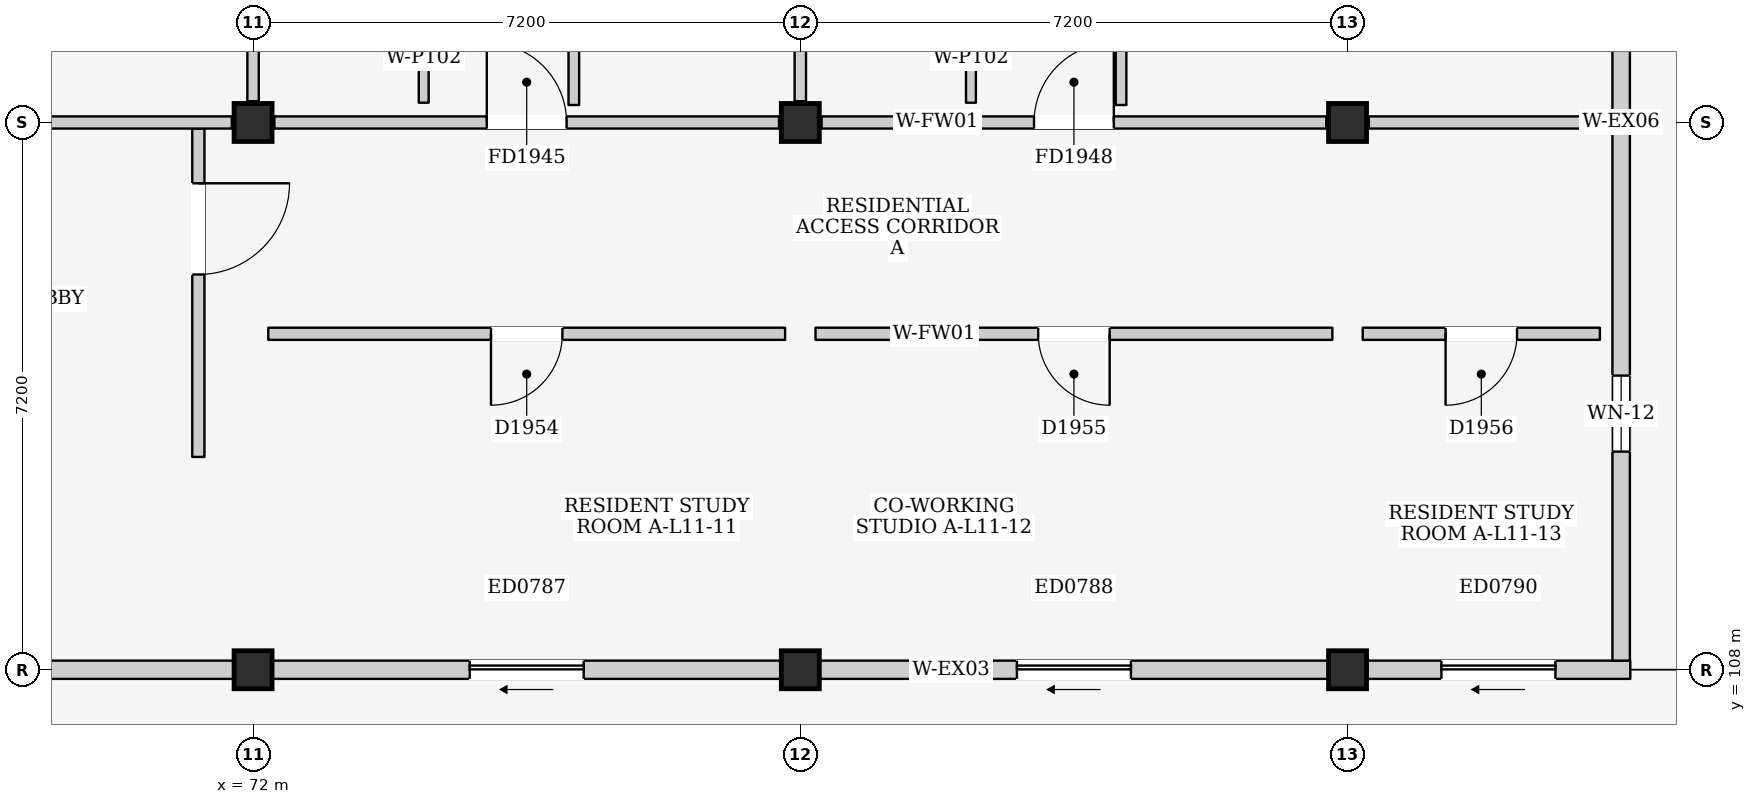
"""IFC4 building model, lengths in metres.
Left out: names, types, materials, properties, quantities, classifications, styles, units other than length and angle.
Written with IfcOpenShell. Run it as: python <this file> out.ifc"""

import sys

from ifc_helpers import new_model, si_unit, direction, frame, frame_2d, origin, origin_2d, place, context, subcontext, project, spatial, rectangle, extrude, element, fill, save


model = new_model("IFC4")
c1 = context("Model", 3, precision=1e-05, world=origin(), true_north=direction((0.0, 1.0)))
c2 = subcontext(c1, "Body", "Model", "MODEL_VIEW")
j1 = project(units=[si_unit("LENGTHUNIT", "METRE"), si_unit("PLANEANGLEUNIT", "RADIAN")], contexts=[c1])
p1 = place(None, origin())
s1 = spatial("IfcSite", under=j1, at=p1, CompositionType="ELEMENT")
p2 = place(p1, origin())
s2 = spatial("IfcBuilding", under=s1, at=p2, CompositionType="ELEMENT")
p3 = place(p2, frame((0.0, 0.0, 38.0)))
s3 = spatial("IfcBuildingStorey", under=s2, at=p3, CompositionType="ELEMENT", Elevation=38.0)
for number, where, z_axis, x_axis in (
    (1, (72.0, 108.0, 0.0), (0.0, 0.0, 1.0), (1.0, 0.0, 0.0)),
    (2, (72.0, 115.2, 0.0), (0.0, 0.0, 1.0), (1.0, 0.0, 0.0)),
    (3, (79.2, 108.0, 0.0), (0.0, 0.0, 1.0), (1.0, 0.0, 0.0)),
    (4, (79.2, 115.2, 0.0), (0.0, 0.0, 1.0), (1.0, 0.0, 0.0)),
    (5, (86.4, 108.0, 0.0), (0.0, 0.0, 1.0), (1.0, 0.0, 0.0)),
    (6, (86.4, 115.2, 0.0), (0.0, 0.0, 1.0), (1.0, 0.0, 0.0)),
):
    element("IfcColumn", number, at=place(p3, frame(where, z_axis=z_axis, x_axis=x_axis)), inside=s3, PredefinedType="COLUMN", context=c2, shape_type="SweptSolid", body=[
        extrude(rectangle(XDim=0.5, YDim=0.5, at=origin_2d()), origin(), (0.0, 0.0, 1.0), 3.2),
    ])
p4 = place(p3, frame((65.05, 108.0, 0.0), z_axis=(0.0, 0.0, 1.0), x_axis=(1.0, 0.0, 0.0)))
e7 = element("IfcWall", 7, at=p4, inside=s3, PredefinedType="ELEMENTEDWALL", context=c2, shape_type="SweptSolid", body=[
    extrude(rectangle(XDim=6.7, YDim=0.24, at=frame_2d((3.35, 0.0))), origin(), (0.0, 0.0, 1.0), 2.325),
])
p5 = place(p4, frame((2.85, 0.0, 1.2)))
e8 = element("IfcOpeningElement", 8, at=p5, cuts=e7, PredefinedType="OPENING", context=c2, shape_type="SweptSolid", body=[
    extrude(rectangle(XDim=1.0, YDim=0.9, at=frame_2d((0.5, 0.45))), frame((0.0, 0.135, 0.0), z_axis=(0.0, -1.0, 0.0), x_axis=(1.0, 0.0, 0.0)), (0.0, 0.0, 1.0), 0.27),
])
p6 = place(p3, frame((72.25, 108.0, 0.0), z_axis=(0.0, 0.0, 1.0), x_axis=(1.0, 0.0, 0.0)))
e9 = element("IfcWall", 9, at=p6, inside=s3, PredefinedType="ELEMENTEDWALL", context=c2, shape_type="SweptSolid", body=[
    extrude(rectangle(XDim=6.7, YDim=0.24, at=frame_2d((3.35, 0.0))), origin(), (0.0, 0.0, 1.0), 2.325),
])
p7 = place(p6, frame((2.6, 0.0, 0.0)))
e10 = element("IfcOpeningElement", 10, at=p7, cuts=e9, PredefinedType="OPENING", context=c2, shape_type="SweptSolid", body=[
    extrude(rectangle(XDim=1.5, YDim=2.12, at=frame_2d((0.75, 1.06))), frame((0.0, 0.135, 0.0), z_axis=(0.0, -1.0, 0.0), x_axis=(1.0, 0.0, 0.0)), (0.0, 0.0, 1.0), 0.27),
])
p8 = place(p3, frame((79.45, 108.0, 0.0), z_axis=(0.0, 0.0, 1.0), x_axis=(1.0, 0.0, 0.0)))
e11 = element("IfcWall", 11, at=p8, inside=s3, PredefinedType="ELEMENTEDWALL", context=c2, shape_type="SweptSolid", body=[
    extrude(rectangle(XDim=6.7, YDim=0.24, at=frame_2d((3.35, 0.0))), origin(), (0.0, 0.0, 1.0), 2.325),
])
p9 = place(p8, frame((2.6, 0.0, 0.0)))
e12 = element("IfcOpeningElement", 12, at=p9, cuts=e11, PredefinedType="OPENING", context=c2, shape_type="SweptSolid", body=[
    extrude(rectangle(XDim=1.5, YDim=2.12, at=frame_2d((0.75, 1.06))), frame((0.0, 0.135, 0.0), z_axis=(0.0, -1.0, 0.0), x_axis=(1.0, 0.0, 0.0)), (0.0, 0.0, 1.0), 0.27),
])
p10 = place(p3, frame((86.65, 108.0, 0.0), z_axis=(0.0, 0.0, 1.0), x_axis=(1.0, 0.0, 0.0)))
e13 = element("IfcWall", 13, at=p10, inside=s3, PredefinedType="ELEMENTEDWALL", context=c2, shape_type="SweptSolid", body=[
    extrude(rectangle(XDim=3.47, YDim=0.24, at=frame_2d((1.735, 0.0))), origin(), (0.0, 0.0, 1.0), 2.325),
])
p11 = place(p10, frame((0.985, 0.0, 0.0)))
e14 = element("IfcOpeningElement", 14, at=p11, cuts=e13, PredefinedType="OPENING", context=c2, shape_type="SweptSolid", body=[
    extrude(rectangle(XDim=1.5, YDim=2.12, at=frame_2d((0.75, 1.06))), frame((0.0, 0.135, 0.0), z_axis=(0.0, -1.0, 0.0), x_axis=(1.0, 0.0, 0.0)), (0.0, 0.0, 1.0), 0.27),
])
p12 = place(p3, frame((90.0, 108.12, 0.0), z_axis=(0.0, 0.0, 1.0), x_axis=(0.0, 1.0, 0.0)))
e15 = element("IfcWall", 15, at=p12, inside=s3, PredefinedType="ELEMENTEDWALL", context=c2, shape_type="SweptSolid", body=[
    extrude(rectangle(XDim=7.08, YDim=0.23, at=frame_2d((3.54, 0.0))), origin(), (0.0, 0.0, 1.0), 2.425),
])
p13 = place(p12, frame((2.75, 0.0, 1.1)))
e16 = element("IfcOpeningElement", 16, at=p13, cuts=e15, PredefinedType="OPENING", context=c2, shape_type="SweptSolid", body=[
    extrude(rectangle(XDim=1.0, YDim=0.9, at=frame_2d((0.5, 0.45))), frame((0.0, 0.13, 0.0), z_axis=(0.0, -1.0, 0.0), x_axis=(1.0, 0.0, 0.0)), (0.0, 0.0, 1.0), 0.26),
])
p14 = place(p3, frame((90.0, 115.2, 0.0), z_axis=(0.0, 0.0, 1.0), x_axis=(0.0, 1.0, 0.0)))
e17 = element("IfcWall", 17, at=p14, inside=s3, PredefinedType="ELEMENTEDWALL", context=c2, shape_type="SweptSolid", body=[
    extrude(rectangle(XDim=7.08, YDim=0.23, at=frame_2d((3.54, 0.0))), origin(), (0.0, 0.0, 1.0), 2.425),
])
p15 = place(p14, frame((3.6, 0.0, 0.0)))
e18 = element("IfcOpeningElement", 18, at=p15, cuts=e17, PredefinedType="OPENING", context=c2, shape_type="SweptSolid", body=[
    extrude(rectangle(XDim=1.08, YDim=2.12, at=frame_2d((0.54, 1.06))), frame((0.0, 0.13, 0.0), z_axis=(0.0, -1.0, 0.0), x_axis=(1.0, 0.0, 0.0)), (0.0, 0.0, 1.0), 0.26),
])
p16 = place(p3, frame((71.28, 110.8, 0.0), z_axis=(0.0, 0.0, 1.0), x_axis=(0.0, 1.0, 0.0)))
e19 = element("IfcWall", 19, at=p16, inside=s3, PredefinedType="PARTITIONING", context=c2, shape_type="SweptSolid", body=[
    extrude(rectangle(XDim=4.32, YDim=0.16, at=frame_2d((2.16, 0.0))), origin(), (0.0, 0.0, 1.0), 2.99),
])
p17 = place(p16, frame((2.4, 0.0, 0.0)))
e20 = element("IfcOpeningElement", 20, at=p17, cuts=e19, PredefinedType="OPENING", context=c2, shape_type="SweptSolid", body=[
    extrude(rectangle(XDim=1.2, YDim=2.2, at=frame_2d((0.6, 1.1))), frame((0.0, 0.095, 0.0), z_axis=(0.0, -1.0, 0.0), x_axis=(1.0, 0.0, 0.0)), (0.0, 0.0, 1.0), 0.19),
])
p18 = place(p3, frame((65.08, 115.2, 0.0), z_axis=(0.0, 0.0, 1.0), x_axis=(1.0, 0.0, 0.0)))
e21 = element("IfcWall", 21, at=p18, inside=s3, PredefinedType="PARTITIONING", context=c2, shape_type="SweptSolid", body=[
    extrude(rectangle(XDim=6.64, YDim=0.16, at=frame_2d((3.32, 0.0))), origin(), (0.0, 0.0, 1.0), 2.325),
])
p19 = place(p18, frame((2.795, 0.0, 0.0)))
e22 = element("IfcOpeningElement", 22, at=p19, cuts=e21, PredefinedType="OPENING", context=c2, shape_type="SweptSolid", body=[
    extrude(rectangle(XDim=1.05, YDim=2.15, at=frame_2d((0.525, 1.075))), frame((0.0, 0.095, 0.0), z_axis=(0.0, -1.0, 0.0), x_axis=(1.0, 0.0, 0.0)), (0.0, 0.0, 1.0), 0.19),
])
p20 = place(p3, frame((72.0, 115.48, 0.0), z_axis=(0.0, 0.0, 1.0), x_axis=(0.0, 1.0, 0.0)))
e23 = element("IfcWall", 23, at=p20, inside=s3, PredefinedType="PARTITIONING", context=c2, shape_type="SweptSolid", body=[
    extrude(rectangle(XDim=6.64, YDim=0.15, at=frame_2d((3.32, 0.0))), origin(), (0.0, 0.0, 1.0), 2.475),
])
p21 = place(p3, frame((72.28, 115.2, 0.0), z_axis=(0.0, 0.0, 1.0), x_axis=(1.0, 0.0, 0.0)))
e24 = element("IfcWall", 24, at=p21, inside=s3, PredefinedType="PARTITIONING", context=c2, shape_type="SweptSolid", body=[
    extrude(rectangle(XDim=6.64, YDim=0.16, at=frame_2d((3.32, 0.0))), origin(), (0.0, 0.0, 1.0), 2.325),
])
p22 = place(p21, frame((2.795, 0.0, 0.0)))
e25 = element("IfcOpeningElement", 25, at=p22, cuts=e24, PredefinedType="OPENING", context=c2, shape_type="SweptSolid", body=[
    extrude(rectangle(XDim=1.05, YDim=2.15, at=frame_2d((0.525, 1.075))), frame((0.0, 0.095, 0.0), z_axis=(0.0, -1.0, 0.0), x_axis=(1.0, 0.0, 0.0)), (0.0, 0.0, 1.0), 0.19),
])
p23 = place(p3, frame((79.2, 115.48, 0.0), z_axis=(0.0, 0.0, 1.0), x_axis=(0.0, 1.0, 0.0)))
e26 = element("IfcWall", 26, at=p23, inside=s3, PredefinedType="PARTITIONING", context=c2, shape_type="SweptSolid", body=[
    extrude(rectangle(XDim=6.64, YDim=0.15, at=frame_2d((3.32, 0.0))), origin(), (0.0, 0.0, 1.0), 2.475),
])
p24 = place(p3, frame((74.245, 115.46, 0.0), z_axis=(0.0, 0.0, 1.0), x_axis=(0.0, 1.0, 0.0)))
e27 = element("IfcWall", 27, at=p24, inside=s3, PredefinedType="PARTITIONING", context=c2, shape_type="SweptSolid", body=[
    extrude(rectangle(XDim=2.13, YDim=0.13, at=frame_2d((1.065, 0.0))), origin(), (0.0, 0.0, 1.0), 2.99),
])
p25 = place(p3, frame((76.22, 115.43, 0.0), z_axis=(0.0, 0.0, 1.0), x_axis=(0.0, 1.0, 0.0)))
e28 = element("IfcWall", 28, at=p25, inside=s3, PredefinedType="PARTITIONING", context=c2, shape_type="SweptSolid", body=[
    extrude(rectangle(XDim=2.15, YDim=0.14, at=frame_2d((1.075, 0.0))), origin(), (0.0, 0.0, 1.0), 2.99),
])
p26 = place(p3, frame((79.48, 115.2, 0.0), z_axis=(0.0, 0.0, 1.0), x_axis=(1.0, 0.0, 0.0)))
e29 = element("IfcWall", 29, at=p26, inside=s3, PredefinedType="PARTITIONING", context=c2, shape_type="SweptSolid", body=[
    extrude(rectangle(XDim=6.64, YDim=0.16, at=frame_2d((3.32, 0.0))), origin(), (0.0, 0.0, 1.0), 2.325),
])
p27 = place(p26, frame((2.795, 0.0, 0.0)))
e30 = element("IfcOpeningElement", 30, at=p27, cuts=e29, PredefinedType="OPENING", context=c2, shape_type="SweptSolid", body=[
    extrude(rectangle(XDim=1.05, YDim=2.15, at=frame_2d((0.525, 1.075))), frame((0.0, 0.095, 0.0), z_axis=(0.0, -1.0, 0.0), x_axis=(1.0, 0.0, 0.0)), (0.0, 0.0, 1.0), 0.19),
])
p28 = place(p3, frame((86.68, 115.2, 0.0), z_axis=(0.0, 0.0, 1.0), x_axis=(1.0, 0.0, 0.0)))
e31 = element("IfcWall", 31, at=p28, inside=s3, PredefinedType="PARTITIONING", context=c2, shape_type="SweptSolid", body=[
    extrude(rectangle(XDim=3.04, YDim=0.16, at=frame_2d((1.52, 0.0))), origin(), (0.0, 0.0, 1.0), 2.325),
])
p29 = place(p3, frame((81.445, 115.46, 0.0), z_axis=(0.0, 0.0, 1.0), x_axis=(0.0, 1.0, 0.0)))
e32 = element("IfcWall", 32, at=p29, inside=s3, PredefinedType="PARTITIONING", context=c2, shape_type="SweptSolid", body=[
    extrude(rectangle(XDim=2.13, YDim=0.13, at=frame_2d((1.065, 0.0))), origin(), (0.0, 0.0, 1.0), 2.99),
])
p30 = place(p3, frame((83.42, 115.43, 0.0), z_axis=(0.0, 0.0, 1.0), x_axis=(0.0, 1.0, 0.0)))
e33 = element("IfcWall", 33, at=p30, inside=s3, PredefinedType="PARTITIONING", context=c2, shape_type="SweptSolid", body=[
    extrude(rectangle(XDim=2.15, YDim=0.14, at=frame_2d((1.075, 0.0))), origin(), (0.0, 0.0, 1.0), 2.99),
])
p31 = place(p3, frame((72.2, 112.42, 0.0), z_axis=(0.0, 0.0, 1.0), x_axis=(1.0, 0.0, 0.0)))
e34 = element("IfcWall", 34, at=p31, inside=s3, PredefinedType="PARTITIONING", context=c2, shape_type="SweptSolid", body=[
    extrude(rectangle(XDim=6.8, YDim=0.16, at=frame_2d((3.4, 0.0))), origin(), (0.0, 0.0, 1.0), 2.99),
])
p32 = place(p31, frame((2.93, 0.0, 0.0)))
e35 = element("IfcOpeningElement", 35, at=p32, cuts=e34, PredefinedType="OPENING", context=c2, shape_type="SweptSolid", body=[
    extrude(rectangle(XDim=0.94, YDim=2.12, at=frame_2d((0.47, 1.06))), frame((0.0, 0.095, 0.0), z_axis=(0.0, -1.0, 0.0), x_axis=(1.0, 0.0, 0.0)), (0.0, 0.0, 1.0), 0.19),
])
p33 = place(p3, frame((79.4, 112.42, 0.0), z_axis=(0.0, 0.0, 1.0), x_axis=(1.0, 0.0, 0.0)))
e36 = element("IfcWall", 36, at=p33, inside=s3, PredefinedType="PARTITIONING", context=c2, shape_type="SweptSolid", body=[
    extrude(rectangle(XDim=6.8, YDim=0.16, at=frame_2d((3.4, 0.0))), origin(), (0.0, 0.0, 1.0), 2.99),
])
p34 = place(p33, frame((2.93, 0.0, 0.0)))
e37 = element("IfcOpeningElement", 37, at=p34, cuts=e36, PredefinedType="OPENING", context=c2, shape_type="SweptSolid", body=[
    extrude(rectangle(XDim=0.94, YDim=2.12, at=frame_2d((0.47, 1.06))), frame((0.0, 0.095, 0.0), z_axis=(0.0, -1.0, 0.0), x_axis=(1.0, 0.0, 0.0)), (0.0, 0.0, 1.0), 0.19),
])
p35 = place(p3, frame((86.6, 112.42, 0.0), z_axis=(0.0, 0.0, 1.0), x_axis=(1.0, 0.0, 0.0)))
e38 = element("IfcWall", 38, at=p35, inside=s3, PredefinedType="PARTITIONING", context=c2, shape_type="SweptSolid", body=[
    extrude(rectangle(XDim=3.12, YDim=0.16, at=frame_2d((1.56, 0.0))), origin(), (0.0, 0.0, 1.0), 2.99),
])
p36 = place(p35, frame((1.09, 0.0, 0.0)))
e39 = element("IfcOpeningElement", 39, at=p36, cuts=e38, PredefinedType="OPENING", context=c2, shape_type="SweptSolid", body=[
    extrude(rectangle(XDim=0.94, YDim=2.12, at=frame_2d((0.47, 1.06))), frame((0.0, 0.095, 0.0), z_axis=(0.0, -1.0, 0.0), x_axis=(1.0, 0.0, 0.0)), (0.0, 0.0, 1.0), 0.19),
])
p37 = place(p7, frame((1.5, 0.0, 0.0), z_axis=(0.0, 0.0, 1.0), x_axis=(-1.0, 0.0, 0.0)))
e40 = element("IfcDoor", 40, at=p37, inside=s3, OperationType="SLIDING_TO_LEFT", PredefinedType="DOOR", context=c2, shape_type="SweptSolid", body=[
    extrude(rectangle(XDim=1.5, YDim=2.12, at=frame_2d((0.75, 1.06))), frame((0.0, 0.025, 0.0), z_axis=(0.0, -1.0, 0.0), x_axis=(1.0, 0.0, 0.0)), (0.0, 0.0, 1.0), 0.05),
])
fill(e10, e40)
p38 = place(p9, frame((1.5, 0.0, 0.0), z_axis=(0.0, 0.0, 1.0), x_axis=(-1.0, 0.0, 0.0)))
e41 = element("IfcDoor", 41, at=p38, inside=s3, OperationType="SLIDING_TO_LEFT", PredefinedType="DOOR", context=c2, shape_type="SweptSolid", body=[
    extrude(rectangle(XDim=1.5, YDim=2.12, at=frame_2d((0.75, 1.06))), frame((0.0, 0.025, 0.0), z_axis=(0.0, -1.0, 0.0), x_axis=(1.0, 0.0, 0.0)), (0.0, 0.0, 1.0), 0.05),
])
fill(e12, e41)
p39 = place(p11, frame((1.5, 0.0, 0.0), z_axis=(0.0, 0.0, 1.0), x_axis=(-1.0, 0.0, 0.0)))
e42 = element("IfcDoor", 42, at=p39, inside=s3, OperationType="SLIDING_TO_LEFT", PredefinedType="DOOR", context=c2, shape_type="SweptSolid", body=[
    extrude(rectangle(XDim=1.5, YDim=2.12, at=frame_2d((0.75, 1.06))), frame((0.0, 0.025, 0.0), z_axis=(0.0, -1.0, 0.0), x_axis=(1.0, 0.0, 0.0)), (0.0, 0.0, 1.0), 0.05),
])
fill(e14, e42)
p40 = place(p13, origin())
e43 = element("IfcWindow", 43, at=p40, inside=s3, PartitioningType="SINGLE_PANEL", PredefinedType="WINDOW", context=c2, shape_type="SweptSolid", body=[
    extrude(rectangle(XDim=1.0, YDim=0.9, at=frame_2d((0.5, 0.45))), frame((0.0, 0.03, 0.0), z_axis=(0.0, -1.0, 0.0), x_axis=(1.0, 0.0, 0.0)), (0.0, 0.0, 1.0), 0.06),
])
fill(e16, e43)
p41 = place(p17, frame((1.2, 0.0, 0.0), z_axis=(0.0, 0.0, 1.0), x_axis=(-1.0, 0.0, 0.0)))
e44 = element("IfcDoor", 44, at=p41, inside=s3, OperationType="SINGLE_SWING_LEFT", PredefinedType="DOOR", context=c2, shape_type="SweptSolid", body=[
    extrude(rectangle(XDim=1.2, YDim=2.2, at=frame_2d((0.6, 1.1))), frame((0.0, 0.025, 0.0), z_axis=(0.0, -1.0, 0.0), x_axis=(1.0, 0.0, 0.0)), (0.0, 0.0, 1.0), 0.05),
])
fill(e20, e44)
p42 = place(p22, origin())
e45 = element("IfcDoor", 45, at=p42, inside=s3, OperationType="SINGLE_SWING_LEFT", PredefinedType="DOOR", context=c2, shape_type="SweptSolid", body=[
    extrude(rectangle(XDim=1.05, YDim=2.15, at=frame_2d((0.525, 1.075))), frame((0.0, 0.025, 0.0), z_axis=(0.0, -1.0, 0.0), x_axis=(1.0, 0.0, 0.0)), (0.0, 0.0, 1.0), 0.05),
])
fill(e25, e45)
p43 = place(p27, origin())
e46 = element("IfcDoor", 46, at=p43, inside=s3, OperationType="SINGLE_SWING_RIGHT", PredefinedType="DOOR", context=c2, shape_type="SweptSolid", body=[
    extrude(rectangle(XDim=1.05, YDim=2.15, at=frame_2d((0.525, 1.075))), frame((0.0, 0.025, 0.0), z_axis=(0.0, -1.0, 0.0), x_axis=(1.0, 0.0, 0.0)), (0.0, 0.0, 1.0), 0.05),
])
fill(e30, e46)
p44 = place(p32, frame((0.94, 0.0, 0.0), z_axis=(0.0, 0.0, 1.0), x_axis=(-1.0, 0.0, 0.0)))
e47 = element("IfcDoor", 47, at=p44, inside=s3, OperationType="SINGLE_SWING_RIGHT", PredefinedType="DOOR", context=c2, shape_type="SweptSolid", body=[
    extrude(rectangle(XDim=0.94, YDim=2.12, at=frame_2d((0.47, 1.06))), frame((0.0, 0.025, 0.0), z_axis=(0.0, -1.0, 0.0), x_axis=(1.0, 0.0, 0.0)), (0.0, 0.0, 1.0), 0.05),
])
fill(e35, e47)
p45 = place(p34, frame((0.94, 0.0, 0.0), z_axis=(0.0, 0.0, 1.0), x_axis=(-1.0, 0.0, 0.0)))
e48 = element("IfcDoor", 48, at=p45, inside=s3, OperationType="SINGLE_SWING_LEFT", PredefinedType="DOOR", context=c2, shape_type="SweptSolid", body=[
    extrude(rectangle(XDim=0.94, YDim=2.12, at=frame_2d((0.47, 1.06))), frame((0.0, 0.025, 0.0), z_axis=(0.0, -1.0, 0.0), x_axis=(1.0, 0.0, 0.0)), (0.0, 0.0, 1.0), 0.05),
])
fill(e37, e48)
p46 = place(p36, frame((0.94, 0.0, 0.0), z_axis=(0.0, 0.0, 1.0), x_axis=(-1.0, 0.0, 0.0)))
e49 = element("IfcDoor", 49, at=p46, inside=s3, OperationType="SINGLE_SWING_RIGHT", PredefinedType="DOOR", context=c2, shape_type="SweptSolid", body=[
    extrude(rectangle(XDim=0.94, YDim=2.12, at=frame_2d((0.47, 1.06))), frame((0.0, 0.025, 0.0), z_axis=(0.0, -1.0, 0.0), x_axis=(1.0, 0.0, 0.0)), (0.0, 0.0, 1.0), 0.05),
])
fill(e39, e49)
save(model, sys.argv[1])
